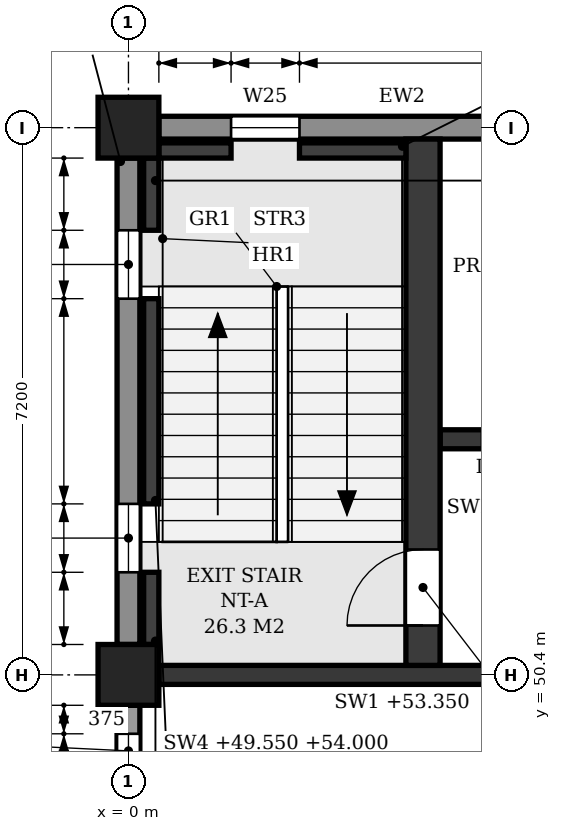
"""IFC4 building model, lengths in metres.
Left out: names, types, materials, properties, quantities, classifications, styles, units other than length and angle.
Written with IfcOpenShell. Run it as: python <this file> out.ifc"""

import sys

from ifc_helpers import new_model, si_unit, direction, frame, frame_2d, origin, origin_2d, place, context, subcontext, project, spatial, polyline, rectangle, outline, extrude, element, fill, save


model = new_model("IFC4")
c1 = context("Model", 3, precision=1e-05, world=origin(), true_north=direction((0.0, 1.0)))
c2 = subcontext(c1, "Body", "Model", "MODEL_VIEW")
j1 = project(units=[si_unit("LENGTHUNIT", "METRE"), si_unit("PLANEANGLEUNIT", "RADIAN")], contexts=[c1])
p1 = place(None, origin())
s1 = spatial("IfcSite", under=j1, at=p1, CompositionType="ELEMENT")
p2 = place(p1, origin())
s2 = spatial("IfcBuilding", under=s1, at=p2, CompositionType="ELEMENT")
p3 = place(p2, frame((0.0, 0.0, 49.8)))
s3 = spatial("IfcBuildingStorey", under=s2, at=p3, CompositionType="ELEMENT", Elevation=49.8)
for number, where, z_axis, x_axis in (
    (1, (0.0, 50.4, 0.0), (0.0, 0.0, 1.0), (1.0, 0.0, 0.0)),
    (2, (0.0, 57.6, 0.0), (0.0, 0.0, 1.0), (1.0, 0.0, 0.0)),
):
    element("IfcColumn", number, at=place(p3, frame(where, z_axis=z_axis, x_axis=x_axis)), inside=s3, PredefinedType="COLUMN", context=c2, shape_type="SweptSolid", body=[
        extrude(rectangle(XDim=0.8, YDim=0.8, at=origin_2d()), origin(), (0.0, 0.0, 1.0), 4.5),
    ])
p4 = place(p3, frame((0.0, 43.6, 0.0), z_axis=(0.0, 0.0, 1.0), x_axis=(0.0, 1.0, 0.0)))
e3 = element("IfcWall", 3, at=p4, inside=s3, PredefinedType="STANDARD", context=c2, shape_type="SweptSolid", body=[
    extrude(rectangle(XDim=6.4, YDim=0.3, at=frame_2d((3.2, 0.0))), origin(), (0.0, 0.0, 1.0), 3.6),
])
p5 = place(p4, frame((0.375, 0.0, 0.9)))
e4 = element("IfcOpeningElement", 4, at=p5, cuts=e3, PredefinedType="OPENING", context=c2, shape_type="SweptSolid", body=[
    extrude(outline(polyline([(0.0, 0.0), (0.45, 0.0), (0.45, 2.35), (0.225, 2.6), (0.0, 2.35), (0.0, 0.0)])), frame((0.0, 0.16, 0.0), z_axis=(0.0, -1.0, 0.0), x_axis=(1.0, 0.0, 0.0)), (0.0, 0.0, 1.0), 0.32),
])
p6 = place(p4, frame((1.175, 0.0, 0.9)))
e5 = element("IfcOpeningElement", 5, at=p6, cuts=e3, PredefinedType="OPENING", context=c2, shape_type="SweptSolid", body=[
    extrude(outline(polyline([(0.0, 0.0), (0.45, 0.0), (0.45, 2.35), (0.225, 2.6), (0.0, 2.35), (0.0, 0.0)])), frame((0.0, 0.16, 0.0), z_axis=(0.0, -1.0, 0.0), x_axis=(1.0, 0.0, 0.0)), (0.0, 0.0, 1.0), 0.32),
])
p7 = place(p4, frame((1.975, 0.0, 0.9)))
e6 = element("IfcOpeningElement", 6, at=p7, cuts=e3, PredefinedType="OPENING", context=c2, shape_type="SweptSolid", body=[
    extrude(outline(polyline([(0.0, 0.0), (0.45, 0.0), (0.45, 2.35), (0.225, 2.6), (0.0, 2.35), (0.0, 0.0)])), frame((0.0, 0.16, 0.0), z_axis=(0.0, -1.0, 0.0), x_axis=(1.0, 0.0, 0.0)), (0.0, 0.0, 1.0), 0.32),
])
p8 = place(p4, frame((3.975, 0.0, 0.9)))
e7 = element("IfcOpeningElement", 7, at=p8, cuts=e3, PredefinedType="OPENING", context=c2, shape_type="SweptSolid", body=[
    extrude(outline(polyline([(0.0, 0.0), (0.45, 0.0), (0.45, 2.35), (0.225, 2.6), (0.0, 2.35), (0.0, 0.0)])), frame((0.0, 0.16, 0.0), z_axis=(0.0, -1.0, 0.0), x_axis=(1.0, 0.0, 0.0)), (0.0, 0.0, 1.0), 0.32),
])
p9 = place(p4, frame((4.775, 0.0, 0.9)))
e8 = element("IfcOpeningElement", 8, at=p9, cuts=e3, PredefinedType="OPENING", context=c2, shape_type="SweptSolid", body=[
    extrude(outline(polyline([(0.0, 0.0), (0.45, 0.0), (0.45, 2.35), (0.225, 2.6), (0.0, 2.35), (0.0, 0.0)])), frame((0.0, 0.16, 0.0), z_axis=(0.0, -1.0, 0.0), x_axis=(1.0, 0.0, 0.0)), (0.0, 0.0, 1.0), 0.32),
])
p10 = place(p4, frame((5.575, 0.0, 0.9)))
e9 = element("IfcOpeningElement", 9, at=p10, cuts=e3, PredefinedType="OPENING", context=c2, shape_type="SweptSolid", body=[
    extrude(outline(polyline([(0.0, 0.0), (0.45, 0.0), (0.45, 2.35), (0.225, 2.6), (0.0, 2.35), (0.0, 0.0)])), frame((0.0, 0.16, 0.0), z_axis=(0.0, -1.0, 0.0), x_axis=(1.0, 0.0, 0.0)), (0.0, 0.0, 1.0), 0.32),
])
p11 = place(p3, frame((0.0, 50.8, 0.0), z_axis=(0.0, 0.0, 1.0), x_axis=(0.0, 1.0, 0.0)))
e10 = element("IfcWall", 10, at=p11, inside=s3, PredefinedType="STANDARD", context=c2, shape_type="SweptSolid", body=[
    extrude(rectangle(XDim=6.4, YDim=0.3, at=frame_2d((3.2, 0.0))), origin(), (0.0, 0.0, 1.0), 3.6),
])
p12 = place(p11, frame((0.95, 0.0, 0.9)))
e11 = element("IfcOpeningElement", 11, at=p12, cuts=e10, PredefinedType="OPENING", context=c2, shape_type="SweptSolid", body=[
    extrude(outline(polyline([(0.0, 0.0), (0.9, 0.0), (0.9, 2.15), (0.45, 2.6), (0.0, 2.15), (0.0, 0.0)])), frame((0.0, 0.16, 0.0), z_axis=(0.0, -1.0, 0.0), x_axis=(1.0, 0.0, 0.0)), (0.0, 0.0, 1.0), 0.32),
])
p13 = place(p11, frame((4.55, 0.0, 0.9)))
e12 = element("IfcOpeningElement", 12, at=p13, cuts=e10, PredefinedType="OPENING", context=c2, shape_type="SweptSolid", body=[
    extrude(outline(polyline([(0.0, 0.0), (0.9, 0.0), (0.9, 2.15), (0.45, 2.6), (0.0, 2.15), (0.0, 0.0)])), frame((0.0, 0.16, 0.0), z_axis=(0.0, -1.0, 0.0), x_axis=(1.0, 0.0, 0.0)), (0.0, 0.0, 1.0), 0.32),
])
p14 = place(p3, frame((6.8, 57.6, 0.0), z_axis=(0.0, 0.0, 1.0), x_axis=(-1.0, 0.0, 0.0)))
e13 = element("IfcWall", 13, at=p14, inside=s3, PredefinedType="STANDARD", context=c2, shape_type="SweptSolid", body=[
    extrude(rectangle(XDim=6.4, YDim=0.3, at=frame_2d((3.2, 0.0))), origin(), (0.0, 0.0, 1.0), 3.6),
])
p15 = place(p14, frame((4.55, 0.0, 0.9)))
e14 = element("IfcOpeningElement", 14, at=p15, cuts=e13, PredefinedType="OPENING", context=c2, shape_type="SweptSolid", body=[
    extrude(outline(polyline([(0.0, 0.0), (0.9, 0.0), (0.9, 2.15), (0.45, 2.6), (0.0, 2.15), (0.0, 0.0)])), frame((0.0, 0.16, 0.0), z_axis=(0.0, -1.0, 0.0), x_axis=(1.0, 0.0, 0.0)), (0.0, 0.0, 1.0), 0.32),
])
p16 = place(p3, frame((0.4, 50.4, 0.0), z_axis=(0.0, 0.0, 1.0), x_axis=(1.0, 0.0, 0.0)))
e15 = element("IfcWall", 15, at=p16, inside=s3, PredefinedType="SHEAR", context=c2, shape_type="SweptSolid", body=[
    extrude(rectangle(XDim=6.4, YDim=0.25, at=frame_2d((3.2, 0.0))), origin(), (0.0, 0.0, 1.0), 3.55),
])
p17 = place(p16, frame((4.85, 0.0, 0.0)))
e16 = element("IfcOpeningElement", 16, at=p17, cuts=e15, PredefinedType="OPENING", context=c2, shape_type="SweptSolid", body=[
    extrude(rectangle(XDim=1.1, YDim=2.1, at=frame_2d((0.55, 1.05))), frame((0.0, 0.135, 0.0), z_axis=(0.0, -1.0, 0.0), x_axis=(1.0, 0.0, 0.0)), (0.0, 0.0, 1.0), 0.27),
])
p18 = place(p3, frame((0.3, 50.8, -0.25), z_axis=(0.0, 0.0, 1.0), x_axis=(0.0, 1.0, 0.0)))
e17 = element("IfcWall", 17, at=p18, inside=s3, PredefinedType="SHEAR", context=c2, shape_type="SweptSolid", body=[
    extrude(rectangle(XDim=0.95, YDim=0.2, at=frame_2d((0.475, 0.0))), origin(), (0.0, 0.0, 1.0), 4.45),
])
p19 = place(p3, frame((0.3, 52.65, -0.25), z_axis=(0.0, 0.0, 1.0), x_axis=(0.0, 1.0, 0.0)))
e18 = element("IfcWall", 18, at=p19, inside=s3, PredefinedType="SHEAR", context=c2, shape_type="SweptSolid", body=[
    extrude(rectangle(XDim=2.7, YDim=0.2, at=frame_2d((1.35, 0.0))), origin(), (0.0, 0.0, 1.0), 4.45),
])
p20 = place(p3, frame((0.3, 56.25, -0.25), z_axis=(0.0, 0.0, 1.0), x_axis=(0.0, 1.0, 0.0)))
e19 = element("IfcWall", 19, at=p20, inside=s3, PredefinedType="SHEAR", context=c2, shape_type="SweptSolid", body=[
    extrude(rectangle(XDim=0.95, YDim=0.2, at=frame_2d((0.475, 0.0))), origin(), (0.0, 0.0, 1.0), 4.45),
])
p21 = place(p3, frame((0.4, 57.3, -0.25), z_axis=(0.0, 0.0, 1.0), x_axis=(1.0, 0.0, 0.0)))
e20 = element("IfcWall", 20, at=p21, inside=s3, PredefinedType="SHEAR", context=c2, shape_type="SweptSolid", body=[
    extrude(rectangle(XDim=0.95, YDim=0.2, at=frame_2d((0.475, 0.0))), origin(), (0.0, 0.0, 1.0), 4.45),
])
p22 = place(p3, frame((2.25, 57.3, -0.25), z_axis=(0.0, 0.0, 1.0), x_axis=(1.0, 0.0, 0.0)))
e21 = element("IfcWall", 21, at=p22, inside=s3, PredefinedType="SHEAR", context=c2, shape_type="SweptSolid", body=[
    extrude(rectangle(XDim=1.4, YDim=0.2, at=frame_2d((0.7, 0.0))), origin(), (0.0, 0.0, 1.0), 4.45),
])
p23 = place(p3, frame((3.875, 50.525, 0.0), z_axis=(0.0, 0.0, 1.0), x_axis=(0.0, 1.0, 0.0)))
e22 = element("IfcWall", 22, at=p23, inside=s3, PredefinedType="SHEAR", context=c2, shape_type="SweptSolid", body=[
    extrude(rectangle(XDim=6.925, YDim=0.45, at=frame_2d((3.462, 0.0))), origin(), (0.0, 0.0, 1.0), 4.2),
])
p24 = place(p23, frame((0.525, 0.0, 0.0)))
e23 = element("IfcOpeningElement", 23, at=p24, cuts=e22, PredefinedType="OPENING", context=c2, shape_type="SweptSolid", body=[
    extrude(rectangle(XDim=1.0, YDim=2.1, at=frame_2d((0.5, 1.05))), frame((0.0, 0.235, 0.0), z_axis=(0.0, -1.0, 0.0), x_axis=(1.0, 0.0, 0.0)), (0.0, 0.0, 1.0), 0.47),
])
p25 = place(p3, frame((4.1, 53.5, 0.0), z_axis=(0.0, 0.0, 1.0), x_axis=(1.0, 0.0, 0.0)))
e24 = element("IfcWall", 24, at=p25, inside=s3, PredefinedType="SHEAR", context=c2, shape_type="SweptSolid", body=[
    extrude(rectangle(XDim=2.975, YDim=0.25, at=frame_2d((1.487, 0.0))), origin(), (0.0, 0.0, 1.0), 4.2),
])
p26 = place(p25, frame((0.55, 0.0, 0.0)))
e25 = element("IfcOpeningElement", 25, at=p26, cuts=e24, PredefinedType="OPENING", context=c2, shape_type="SweptSolid", body=[
    extrude(rectangle(XDim=0.9, YDim=2.1, at=frame_2d((0.45, 1.05))), frame((0.0, 0.135, 0.0), z_axis=(0.0, -1.0, 0.0), x_axis=(1.0, 0.0, 0.0)), (0.0, 0.0, 1.0), 0.27),
])
p27 = place(p15, origin())
e26 = element("IfcWindow", 26, at=p27, inside=s3, PartitioningType="SINGLE_PANEL", PredefinedType="WINDOW", context=c2, shape_type="SweptSolid", body=[
    extrude(outline(polyline([(0.0, 0.0), (0.9, 0.0), (0.9, 2.15), (0.45, 2.6), (0.0, 2.15), (0.0, 0.0)])), frame((0.0, 0.03, 0.0), z_axis=(0.0, -1.0, 0.0), x_axis=(1.0, 0.0, 0.0)), (0.0, 0.0, 1.0), 0.06),
])
fill(e14, e26)
p28 = place(p10, origin())
e27 = element("IfcWindow", 27, at=p28, inside=s3, PartitioningType="SINGLE_PANEL", PredefinedType="WINDOW", context=c2, shape_type="SweptSolid", body=[
    extrude(outline(polyline([(0.0, 0.0), (0.45, 0.0), (0.45, 2.35), (0.225, 2.6), (0.0, 2.35), (0.0, 0.0)])), frame((0.0, 0.03, 0.0), z_axis=(0.0, -1.0, 0.0), x_axis=(1.0, 0.0, 0.0)), (0.0, 0.0, 1.0), 0.06),
])
fill(e9, e27)
p29 = place(p12, origin())
e28 = element("IfcWindow", 28, at=p29, inside=s3, PartitioningType="SINGLE_PANEL", PredefinedType="WINDOW", context=c2, shape_type="SweptSolid", body=[
    extrude(outline(polyline([(0.0, 0.0), (0.9, 0.0), (0.9, 2.15), (0.45, 2.6), (0.0, 2.15), (0.0, 0.0)])), frame((0.0, 0.03, 0.0), z_axis=(0.0, -1.0, 0.0), x_axis=(1.0, 0.0, 0.0)), (0.0, 0.0, 1.0), 0.06),
])
fill(e11, e28)
p30 = place(p13, origin())
e29 = element("IfcWindow", 29, at=p30, inside=s3, PartitioningType="SINGLE_PANEL", PredefinedType="WINDOW", context=c2, shape_type="SweptSolid", body=[
    extrude(outline(polyline([(0.0, 0.0), (0.9, 0.0), (0.9, 2.15), (0.45, 2.6), (0.0, 2.15), (0.0, 0.0)])), frame((0.0, 0.03, 0.0), z_axis=(0.0, -1.0, 0.0), x_axis=(1.0, 0.0, 0.0)), (0.0, 0.0, 1.0), 0.06),
])
fill(e12, e29)
p31 = place(p24, origin())
e30 = element("IfcDoor", 30, at=p31, inside=s3, OperationType="SINGLE_SWING_LEFT", PredefinedType="DOOR", context=c2, shape_type="SweptSolid", body=[
    extrude(rectangle(XDim=1.0, YDim=2.1, at=frame_2d((0.5, 1.05))), frame((0.0, 0.025, 0.0), z_axis=(0.0, -1.0, 0.0), x_axis=(1.0, 0.0, 0.0)), (0.0, 0.0, 1.0), 0.05),
])
fill(e23, e30)
save(model, sys.argv[1])
